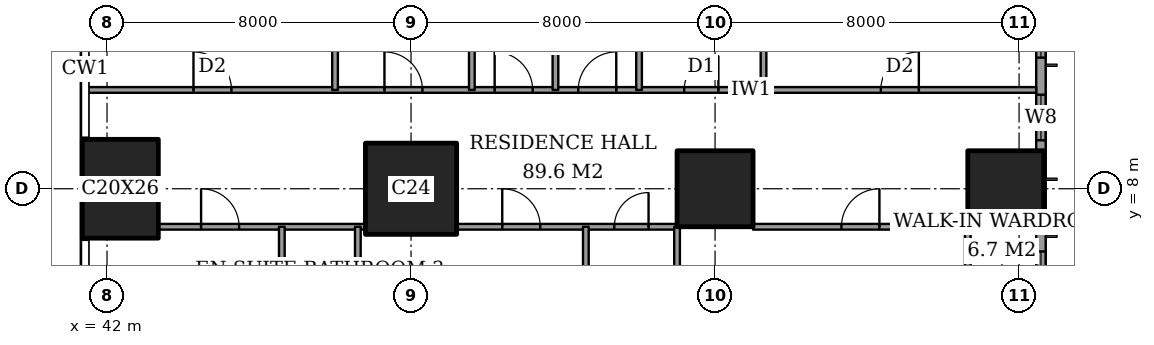
"""IFC4 building model, lengths in metres.
Left out: names, types, materials, properties, quantities, classifications, styles, units other than length and angle.
Written with IfcOpenShell. Run it as: python <this file> out.ifc"""

import sys

from ifc_helpers import new_model, si_unit, direction, frame, frame_2d, origin, origin_2d, place, context, subcontext, project, spatial, rectangle, extrude, element, fill, save


model = new_model("IFC4")
c1 = context("Model", 3, precision=1e-05, world=origin(), true_north=direction((0.0, 1.0)))
c2 = subcontext(c1, "Body", "Model", "MODEL_VIEW")
j1 = project(units=[si_unit("LENGTHUNIT", "METRE"), si_unit("PLANEANGLEUNIT", "RADIAN")], contexts=[c1])
p1 = place(None, origin())
s1 = spatial("IfcSite", under=j1, at=p1, CompositionType="ELEMENT")
p2 = place(p1, origin())
s2 = spatial("IfcBuilding", under=s1, at=p2, CompositionType="ELEMENT")
p3 = place(p2, frame((0.0, 0.0, 72.8)))
s3 = spatial("IfcBuildingStorey", under=s2, at=p3, CompositionType="ELEMENT", Elevation=72.8)
p4 = place(p3, frame((42.35, 8.0, 0.0), z_axis=(0.0, 0.0, 1.0), x_axis=(1.0, 0.0, 0.0)))
e1 = element("IfcColumn", 1, at=p4, inside=s3, PredefinedType="COLUMN", context=c2, shape_type="SweptSolid", body=[
    extrude(rectangle(XDim=2.0, YDim=2.6, at=origin_2d()), origin(), (0.0, 0.0, 1.0), 3.6),
])
p5 = place(p3, frame((50.0, 8.0, 0.0), z_axis=(0.0, 0.0, 1.0), x_axis=(1.0, 0.0, 0.0)))
e2 = element("IfcColumn", 2, at=p5, inside=s3, PredefinedType="COLUMN", context=c2, shape_type="SweptSolid", body=[
    extrude(rectangle(XDim=2.4, YDim=2.4, at=origin_2d()), origin(), (0.0, 0.0, 1.0), 3.6),
])
for number, where, z_axis, x_axis in (
    (3, (58.0, 8.0, 0.0), (0.0, 0.0, 1.0), (1.0, 0.0, 0.0)),
    (4, (65.65, 8.0, 0.0), (0.0, 0.0, 1.0), (1.0, 0.0, 0.0)),
):
    element("IfcColumn", number, at=place(p3, frame(where, z_axis=z_axis, x_axis=x_axis)), inside=s3, PredefinedType="COLUMN", context=c2, shape_type="SweptSolid", body=[
        extrude(rectangle(XDim=2.0, YDim=2.0, at=origin_2d()), origin(), (0.0, 0.0, 1.0), 3.6),
    ])
p6 = place(p3, frame((66.575, 3.175, 0.0), z_axis=(0.0, 0.0, 1.0), x_axis=(0.0, 1.0, 0.0)))
e5 = element("IfcWall", 5, at=p6, inside=s3, PredefinedType="SOLIDWALL", context=c2, shape_type="SweptSolid", body=[
    extrude(rectangle(XDim=41.65, YDim=0.25, at=frame_2d((20.825, 0.0))), origin(), (0.0, 0.0, 1.0), 3.6),
])
p7 = place(p6, frame((0.775, 0.0, 0.6)))
e6 = element("IfcOpeningElement", 6, at=p7, cuts=e5, PredefinedType="OPENING", context=c2, shape_type="SweptSolid", body=[
    extrude(rectangle(XDim=2.4, YDim=2.0, at=frame_2d((1.2, 1.0))), frame((0.0, 0.135, 0.0), z_axis=(0.0, -1.0, 0.0), x_axis=(1.0, 0.0, 0.0)), (0.0, 0.0, 1.0), 0.27),
])
p8 = place(p6, frame((6.1, 0.0, 0.6)))
e7 = element("IfcOpeningElement", 7, at=p8, cuts=e5, PredefinedType="OPENING", context=c2, shape_type="SweptSolid", body=[
    extrude(rectangle(XDim=1.2, YDim=2.0, at=frame_2d((0.6, 1.0))), frame((0.0, 0.135, 0.0), z_axis=(0.0, -1.0, 0.0), x_axis=(1.0, 0.0, 0.0)), (0.0, 0.0, 1.0), 0.27),
])
p9 = place(p6, frame((8.275, 0.0, 0.6)))
e8 = element("IfcOpeningElement", 8, at=p9, cuts=e5, PredefinedType="OPENING", context=c2, shape_type="SweptSolid", body=[
    extrude(rectangle(XDim=2.4, YDim=2.0, at=frame_2d((1.2, 1.0))), frame((0.0, 0.135, 0.0), z_axis=(0.0, -1.0, 0.0), x_axis=(1.0, 0.0, 0.0)), (0.0, 0.0, 1.0), 0.27),
])
p10 = place(p6, frame((15.775, 0.0, 0.6)))
e9 = element("IfcOpeningElement", 9, at=p10, cuts=e5, PredefinedType="OPENING", context=c2, shape_type="SweptSolid", body=[
    extrude(rectangle(XDim=2.4, YDim=2.0, at=frame_2d((1.2, 1.0))), frame((0.0, 0.135, 0.0), z_axis=(0.0, -1.0, 0.0), x_axis=(1.0, 0.0, 0.0)), (0.0, 0.0, 1.0), 0.27),
])
p11 = place(p6, frame((23.475, 0.0, 0.6)))
e10 = element("IfcOpeningElement", 10, at=p11, cuts=e5, PredefinedType="OPENING", context=c2, shape_type="SweptSolid", body=[
    extrude(rectangle(XDim=2.4, YDim=2.0, at=frame_2d((1.2, 1.0))), frame((0.0, 0.135, 0.0), z_axis=(0.0, -1.0, 0.0), x_axis=(1.0, 0.0, 0.0)), (0.0, 0.0, 1.0), 0.27),
])
p12 = place(p6, frame((30.975, 0.0, 0.6)))
e11 = element("IfcOpeningElement", 11, at=p12, cuts=e5, PredefinedType="OPENING", context=c2, shape_type="SweptSolid", body=[
    extrude(rectangle(XDim=2.4, YDim=2.0, at=frame_2d((1.2, 1.0))), frame((0.0, 0.135, 0.0), z_axis=(0.0, -1.0, 0.0), x_axis=(1.0, 0.0, 0.0)), (0.0, 0.0, 1.0), 0.27),
])
p13 = place(p6, frame((34.5, 0.0, 0.6)))
e12 = element("IfcOpeningElement", 12, at=p13, cuts=e5, PredefinedType="OPENING", context=c2, shape_type="SweptSolid", body=[
    extrude(rectangle(XDim=1.2, YDim=2.0, at=frame_2d((0.6, 1.0))), frame((0.0, 0.135, 0.0), z_axis=(0.0, -1.0, 0.0), x_axis=(1.0, 0.0, 0.0)), (0.0, 0.0, 1.0), 0.27),
])
p14 = place(p6, frame((38.475, 0.0, 0.6)))
e13 = element("IfcOpeningElement", 13, at=p14, cuts=e5, PredefinedType="OPENING", context=c2, shape_type="SweptSolid", body=[
    extrude(rectangle(XDim=2.4, YDim=2.0, at=frame_2d((1.2, 1.0))), frame((0.0, 0.135, 0.0), z_axis=(0.0, -1.0, 0.0), x_axis=(1.0, 0.0, 0.0)), (0.0, 0.0, 1.0), 0.27),
])
p15 = place(p3, frame((43.35, 7.0, 0.0), z_axis=(0.0, 0.0, 1.0), x_axis=(1.0, 0.0, 0.0)))
e14 = element("IfcWall", 14, at=p15, inside=s3, PredefinedType="PARTITIONING", context=c2, shape_type="SweptSolid", body=[
    extrude(rectangle(XDim=5.45, YDim=0.15, at=frame_2d((2.725, 0.0))), origin(), (0.0, 0.0, 1.0), 3.35),
])
p16 = place(p15, frame((1.125, 0.0, 0.0)))
e15 = element("IfcOpeningElement", 15, at=p16, cuts=e14, PredefinedType="OPENING", context=c2, shape_type="SweptSolid", body=[
    extrude(rectangle(XDim=1.0, YDim=2.1, at=frame_2d((0.5, 1.05))), frame((0.0, 0.085, 0.0), z_axis=(0.0, -1.0, 0.0), x_axis=(1.0, 0.0, 0.0)), (0.0, 0.0, 1.0), 0.17),
])
p17 = place(p3, frame((51.2, 7.0, 0.0), z_axis=(0.0, 0.0, 1.0), x_axis=(1.0, 0.0, 0.0)))
e16 = element("IfcWall", 16, at=p17, inside=s3, PredefinedType="PARTITIONING", context=c2, shape_type="SweptSolid", body=[
    extrude(rectangle(XDim=5.8, YDim=0.15, at=frame_2d((2.9, 0.0))), origin(), (0.0, 0.0, 1.0), 3.35),
])
p18 = place(p17, frame((4.15, 0.0, 0.0)))
e17 = element("IfcOpeningElement", 17, at=p18, cuts=e16, PredefinedType="OPENING", context=c2, shape_type="SweptSolid", body=[
    extrude(rectangle(XDim=0.9, YDim=2.1, at=frame_2d((0.45, 1.05))), frame((0.0, 0.085, 0.0), z_axis=(0.0, -1.0, 0.0), x_axis=(1.0, 0.0, 0.0)), (0.0, 0.0, 1.0), 0.17),
])
p19 = place(p17, frame((1.2, 0.0, 0.0)))
e18 = element("IfcOpeningElement", 18, at=p19, cuts=e16, PredefinedType="OPENING", context=c2, shape_type="SweptSolid", body=[
    extrude(rectangle(XDim=1.0, YDim=2.1, at=frame_2d((0.5, 1.05))), frame((0.0, 0.085, 0.0), z_axis=(0.0, -1.0, 0.0), x_axis=(1.0, 0.0, 0.0)), (0.0, 0.0, 1.0), 0.17),
])
p20 = place(p3, frame((59.0, 7.0, 0.0), z_axis=(0.0, 0.0, 1.0), x_axis=(1.0, 0.0, 0.0)))
e19 = element("IfcWall", 19, at=p20, inside=s3, PredefinedType="PARTITIONING", context=c2, shape_type="SweptSolid", body=[
    extrude(rectangle(XDim=5.65, YDim=0.15, at=frame_2d((2.825, 0.0))), origin(), (0.0, 0.0, 1.0), 3.35),
])
p21 = place(p20, frame((2.325, 0.0, 0.0)))
e20 = element("IfcOpeningElement", 20, at=p21, cuts=e19, PredefinedType="OPENING", context=c2, shape_type="SweptSolid", body=[
    extrude(rectangle(XDim=1.0, YDim=2.1, at=frame_2d((0.5, 1.05))), frame((0.0, 0.085, 0.0), z_axis=(0.0, -1.0, 0.0), x_axis=(1.0, 0.0, 0.0)), (0.0, 0.0, 1.0), 0.17),
])
p22 = place(p3, frame((41.439, 10.6, 0.0), z_axis=(0.0, 0.0, 1.0), x_axis=(1.0, 0.0, 0.0)))
e21 = element("IfcWall", 21, at=p22, inside=s3, PredefinedType="PARTITIONING", context=c2, shape_type="SweptSolid", body=[
    extrude(rectangle(XDim=25.011, YDim=0.15, at=frame_2d((12.505, 0.0))), origin(), (0.0, 0.0, 1.0), 3.35),
])
p23 = place(p22, frame((10.761, 0.0, 0.0)))
e22 = element("IfcOpeningElement", 22, at=p23, cuts=e21, PredefinedType="OPENING", context=c2, shape_type="SweptSolid", body=[
    extrude(rectangle(XDim=1.0, YDim=2.1, at=frame_2d((0.5, 1.05))), frame((0.0, 0.085, 0.0), z_axis=(0.0, -1.0, 0.0), x_axis=(1.0, 0.0, 0.0)), (0.0, 0.0, 1.0), 0.17),
])
p24 = place(p22, frame((20.924, 0.0, 0.0)))
e23 = element("IfcOpeningElement", 23, at=p24, cuts=e21, PredefinedType="OPENING", context=c2, shape_type="SweptSolid", body=[
    extrude(rectangle(XDim=1.0, YDim=2.1, at=frame_2d((0.5, 1.05))), frame((0.0, 0.085, 0.0), z_axis=(0.0, -1.0, 0.0), x_axis=(1.0, 0.0, 0.0)), (0.0, 0.0, 1.0), 0.17),
])
p25 = place(p22, frame((15.749, 0.0, 0.0)))
e24 = element("IfcOpeningElement", 24, at=p25, cuts=e21, PredefinedType="OPENING", context=c2, shape_type="SweptSolid", body=[
    extrude(rectangle(XDim=0.9, YDim=2.1, at=frame_2d((0.45, 1.05))), frame((0.0, 0.085, 0.0), z_axis=(0.0, -1.0, 0.0), x_axis=(1.0, 0.0, 0.0)), (0.0, 0.0, 1.0), 0.17),
])
p26 = place(p22, frame((12.961, 0.0, 0.0)))
e25 = element("IfcOpeningElement", 25, at=p26, cuts=e21, PredefinedType="OPENING", context=c2, shape_type="SweptSolid", body=[
    extrude(rectangle(XDim=1.0, YDim=2.1, at=frame_2d((0.5, 1.05))), frame((0.0, 0.085, 0.0), z_axis=(0.0, -1.0, 0.0), x_axis=(1.0, 0.0, 0.0)), (0.0, 0.0, 1.0), 0.17),
])
p27 = place(p22, frame((7.861, 0.0, 0.0)))
e26 = element("IfcOpeningElement", 26, at=p27, cuts=e21, PredefinedType="OPENING", context=c2, shape_type="SweptSolid", body=[
    extrude(rectangle(XDim=1.0, YDim=2.1, at=frame_2d((0.5, 1.05))), frame((0.0, 0.085, 0.0), z_axis=(0.0, -1.0, 0.0), x_axis=(1.0, 0.0, 0.0)), (0.0, 0.0, 1.0), 0.17),
])
p28 = place(p22, frame((2.836, 0.0, 0.0)))
e27 = element("IfcOpeningElement", 27, at=p28, cuts=e21, PredefinedType="OPENING", context=c2, shape_type="SweptSolid", body=[
    extrude(rectangle(XDim=1.0, YDim=2.1, at=frame_2d((0.5, 1.05))), frame((0.0, 0.085, 0.0), z_axis=(0.0, -1.0, 0.0), x_axis=(1.0, 0.0, 0.0)), (0.0, 0.0, 1.0), 0.17),
])
p29 = place(p3, frame((46.6, -0.45, 0.0), z_axis=(0.0, 0.0, 1.0), x_axis=(0.0, 1.0, 0.0)))
e28 = element("IfcWall", 28, at=p29, inside=s3, PredefinedType="PARTITIONING", context=c2, shape_type="SweptSolid", body=[
    extrude(rectangle(XDim=7.45, YDim=0.15, at=frame_2d((3.725, 0.0))), origin(), (0.0, 0.0, 1.0), 3.35),
])
p30 = place(p29, frame((3.275, 0.0, 0.0)))
e29 = element("IfcOpeningElement", 29, at=p30, cuts=e28, PredefinedType="OPENING", context=c2, shape_type="SweptSolid", body=[
    extrude(rectangle(XDim=0.9, YDim=2.1, at=frame_2d((0.45, 1.05))), frame((0.0, 0.085, 0.0), z_axis=(0.0, -1.0, 0.0), x_axis=(1.0, 0.0, 0.0)), (0.0, 0.0, 1.0), 0.17),
])
p31 = place(p3, frame((48.0, 10.6, 0.0), z_axis=(0.0, 0.0, 1.0), x_axis=(0.0, 1.0, 0.0)))
e30 = element("IfcWall", 30, at=p31, inside=s3, PredefinedType="PARTITIONING", context=c2, shape_type="SweptSolid", body=[
    extrude(rectangle(XDim=6.4, YDim=0.15, at=frame_2d((3.2, 0.0))), origin(), (0.0, 0.0, 1.0), 3.35),
])
p32 = place(p3, frame((48.6, -0.45, 0.0), z_axis=(0.0, 0.0, 1.0), x_axis=(0.0, 1.0, 0.0)))
e31 = element("IfcWall", 31, at=p32, inside=s3, PredefinedType="PARTITIONING", context=c2, shape_type="SweptSolid", body=[
    extrude(rectangle(XDim=7.45, YDim=0.15, at=frame_2d((3.725, 0.0))), origin(), (0.0, 0.0, 1.0), 3.35),
])
for number, where, z_axis, x_axis in (
    (32, (51.6, 10.6, 0.0), (0.0, 0.0, 1.0), (0.0, 1.0, 0.0)),
    (33, (53.8, 10.6, 0.0), (0.0, 0.0, 1.0), (0.0, 1.0, 0.0)),
):
    element("IfcWall", number, at=place(p3, frame(where, z_axis=z_axis, x_axis=x_axis)), inside=s3, PredefinedType="PARTITIONING", context=c2, shape_type="SweptSolid", body=[
        extrude(rectangle(XDim=6.4, YDim=0.15, at=frame_2d((3.2, 0.0))), origin(), (0.0, 0.0, 1.0), 3.35),
    ])
p33 = place(p3, frame((54.6, -0.45, 0.0), z_axis=(0.0, 0.0, 1.0), x_axis=(0.0, 1.0, 0.0)))
e34 = element("IfcWall", 34, at=p33, inside=s3, PredefinedType="PARTITIONING", context=c2, shape_type="SweptSolid", body=[
    extrude(rectangle(XDim=7.45, YDim=0.15, at=frame_2d((3.725, 0.0))), origin(), (0.0, 0.0, 1.0), 3.35),
])
p34 = place(p3, frame((56.0, 10.6, 0.0), z_axis=(0.0, 0.0, 1.0), x_axis=(0.0, 1.0, 0.0)))
e35 = element("IfcWall", 35, at=p34, inside=s3, PredefinedType="PARTITIONING", context=c2, shape_type="SweptSolid", body=[
    extrude(rectangle(XDim=11.0, YDim=0.15, at=frame_2d((5.5, 0.0))), origin(), (0.0, 0.0, 1.0), 3.35),
])
p35 = place(p34, frame((8.2, 0.0, 0.0)))
e36 = element("IfcOpeningElement", 36, at=p35, cuts=e35, PredefinedType="OPENING", context=c2, shape_type="SweptSolid", body=[
    extrude(rectangle(XDim=1.0, YDim=2.1, at=frame_2d((0.5, 1.05))), frame((0.0, 0.085, 0.0), z_axis=(0.0, -1.0, 0.0), x_axis=(1.0, 0.0, 0.0)), (0.0, 0.0, 1.0), 0.17),
])
p36 = place(p3, frame((57.0, 1.35, 0.0), z_axis=(0.0, 0.0, 1.0), x_axis=(0.0, 1.0, 0.0)))
e37 = element("IfcWall", 37, at=p36, inside=s3, PredefinedType="PARTITIONING", context=c2, shape_type="SweptSolid", body=[
    extrude(rectangle(XDim=5.65, YDim=0.15, at=frame_2d((2.825, 0.0))), origin(), (0.0, 0.0, 1.0), 3.35),
])
p37 = place(p3, frame((59.275, 10.6, 0.0), z_axis=(0.0, 0.0, 1.0), x_axis=(0.0, 1.0, 0.0)))
e38 = element("IfcWall", 38, at=p37, inside=s3, PredefinedType="PARTITIONING", context=c2, shape_type="SweptSolid", body=[
    extrude(rectangle(XDim=4.2, YDim=0.15, at=frame_2d((2.1, 0.0))), origin(), (0.0, 0.0, 1.0), 3.35),
])
p38 = place(p3, frame((64.65, 3.3, 0.0), z_axis=(0.0, 0.0, 1.0), x_axis=(0.0, 1.0, 0.0)))
e39 = element("IfcWall", 39, at=p38, inside=s3, PredefinedType="PARTITIONING", context=c2, shape_type="SweptSolid", body=[
    extrude(rectangle(XDim=3.7, YDim=0.15, at=frame_2d((1.85, 0.0))), origin(), (0.0, 0.0, 1.0), 3.35),
])
p39 = place(p38, frame((1.4, 0.0, 0.0)))
e40 = element("IfcOpeningElement", 40, at=p39, cuts=e39, PredefinedType="OPENING", context=c2, shape_type="SweptSolid", body=[
    extrude(rectangle(XDim=0.9, YDim=2.1, at=frame_2d((0.45, 1.05))), frame((0.0, 0.085, 0.0), z_axis=(0.0, -1.0, 0.0), x_axis=(1.0, 0.0, 0.0)), (0.0, 0.0, 1.0), 0.17),
])
p40 = place(p7, origin())
e41 = element("IfcWindow", 41, at=p40, inside=s3, PartitioningType="SINGLE_PANEL", PredefinedType="WINDOW", context=c2, shape_type="SweptSolid", body=[
    extrude(rectangle(XDim=2.4, YDim=2.0, at=frame_2d((1.2, 1.0))), frame((0.0, 0.03, 0.0), z_axis=(0.0, -1.0, 0.0), x_axis=(1.0, 0.0, 0.0)), (0.0, 0.0, 1.0), 0.06),
])
fill(e6, e41)
p41 = place(p8, origin())
e42 = element("IfcWindow", 42, at=p41, inside=s3, PartitioningType="SINGLE_PANEL", PredefinedType="WINDOW", context=c2, shape_type="SweptSolid", body=[
    extrude(rectangle(XDim=1.2, YDim=2.0, at=frame_2d((0.6, 1.0))), frame((0.0, 0.03, 0.0), z_axis=(0.0, -1.0, 0.0), x_axis=(1.0, 0.0, 0.0)), (0.0, 0.0, 1.0), 0.06),
])
fill(e7, e42)
p42 = place(p9, origin())
e43 = element("IfcWindow", 43, at=p42, inside=s3, PartitioningType="SINGLE_PANEL", PredefinedType="WINDOW", context=c2, shape_type="SweptSolid", body=[
    extrude(rectangle(XDim=2.4, YDim=2.0, at=frame_2d((1.2, 1.0))), frame((0.0, 0.03, 0.0), z_axis=(0.0, -1.0, 0.0), x_axis=(1.0, 0.0, 0.0)), (0.0, 0.0, 1.0), 0.06),
])
fill(e8, e43)
p43 = place(p21, origin())
e44 = element("IfcDoor", 44, at=p43, inside=s3, OperationType="SINGLE_SWING_LEFT", PredefinedType="DOOR", context=c2, shape_type="SweptSolid", body=[
    extrude(rectangle(XDim=1.0, YDim=2.1, at=frame_2d((0.5, 1.05))), frame((0.0, 0.025, 0.0), z_axis=(0.0, -1.0, 0.0), x_axis=(1.0, 0.0, 0.0)), (0.0, 0.0, 1.0), 0.05),
])
fill(e20, e44)
p44 = place(p18, origin())
e45 = element("IfcDoor", 45, at=p44, inside=s3, OperationType="SINGLE_SWING_LEFT", PredefinedType="DOOR", context=c2, shape_type="SweptSolid", body=[
    extrude(rectangle(XDim=0.9, YDim=2.1, at=frame_2d((0.45, 1.05))), frame((0.0, 0.025, 0.0), z_axis=(0.0, -1.0, 0.0), x_axis=(1.0, 0.0, 0.0)), (0.0, 0.0, 1.0), 0.05),
])
fill(e17, e45)
p45 = place(p19, origin())
e46 = element("IfcDoor", 46, at=p45, inside=s3, OperationType="SINGLE_SWING_RIGHT", PredefinedType="DOOR", context=c2, shape_type="SweptSolid", body=[
    extrude(rectangle(XDim=1.0, YDim=2.1, at=frame_2d((0.5, 1.05))), frame((0.0, 0.025, 0.0), z_axis=(0.0, -1.0, 0.0), x_axis=(1.0, 0.0, 0.0)), (0.0, 0.0, 1.0), 0.05),
])
fill(e18, e46)
p46 = place(p16, origin())
e47 = element("IfcDoor", 47, at=p46, inside=s3, OperationType="SINGLE_SWING_RIGHT", PredefinedType="DOOR", context=c2, shape_type="SweptSolid", body=[
    extrude(rectangle(XDim=1.0, YDim=2.1, at=frame_2d((0.5, 1.05))), frame((0.0, 0.025, 0.0), z_axis=(0.0, -1.0, 0.0), x_axis=(1.0, 0.0, 0.0)), (0.0, 0.0, 1.0), 0.05),
])
fill(e15, e47)
p47 = place(p23, origin())
e48 = element("IfcDoor", 48, at=p47, inside=s3, OperationType="SINGLE_SWING_RIGHT", PredefinedType="DOOR", context=c2, shape_type="SweptSolid", body=[
    extrude(rectangle(XDim=1.0, YDim=2.1, at=frame_2d((0.5, 1.05))), frame((0.0, 0.025, 0.0), z_axis=(0.0, -1.0, 0.0), x_axis=(1.0, 0.0, 0.0)), (0.0, 0.0, 1.0), 0.05),
])
fill(e22, e48)
p48 = place(p24, origin())
e49 = element("IfcDoor", 49, at=p48, inside=s3, OperationType="SINGLE_SWING_LEFT", PredefinedType="DOOR", context=c2, shape_type="SweptSolid", body=[
    extrude(rectangle(XDim=1.0, YDim=2.1, at=frame_2d((0.5, 1.05))), frame((0.0, 0.025, 0.0), z_axis=(0.0, -1.0, 0.0), x_axis=(1.0, 0.0, 0.0)), (0.0, 0.0, 1.0), 0.05),
])
fill(e23, e49)
p49 = place(p25, origin())
e50 = element("IfcDoor", 50, at=p49, inside=s3, OperationType="SINGLE_SWING_LEFT", PredefinedType="DOOR", context=c2, shape_type="SweptSolid", body=[
    extrude(rectangle(XDim=0.9, YDim=2.1, at=frame_2d((0.45, 1.05))), frame((0.0, 0.025, 0.0), z_axis=(0.0, -1.0, 0.0), x_axis=(1.0, 0.0, 0.0)), (0.0, 0.0, 1.0), 0.05),
])
fill(e24, e50)
p50 = place(p26, origin())
e51 = element("IfcDoor", 51, at=p50, inside=s3, OperationType="SINGLE_SWING_LEFT", PredefinedType="DOOR", context=c2, shape_type="SweptSolid", body=[
    extrude(rectangle(XDim=1.0, YDim=2.1, at=frame_2d((0.5, 1.05))), frame((0.0, 0.025, 0.0), z_axis=(0.0, -1.0, 0.0), x_axis=(1.0, 0.0, 0.0)), (0.0, 0.0, 1.0), 0.05),
])
fill(e25, e51)
p51 = place(p27, origin())
e52 = element("IfcDoor", 52, at=p51, inside=s3, OperationType="SINGLE_SWING_RIGHT", PredefinedType="DOOR", context=c2, shape_type="SweptSolid", body=[
    extrude(rectangle(XDim=1.0, YDim=2.1, at=frame_2d((0.5, 1.05))), frame((0.0, 0.025, 0.0), z_axis=(0.0, -1.0, 0.0), x_axis=(1.0, 0.0, 0.0)), (0.0, 0.0, 1.0), 0.05),
])
fill(e26, e52)
p52 = place(p28, origin())
e53 = element("IfcDoor", 53, at=p52, inside=s3, OperationType="SINGLE_SWING_RIGHT", PredefinedType="DOOR", context=c2, shape_type="SweptSolid", body=[
    extrude(rectangle(XDim=1.0, YDim=2.1, at=frame_2d((0.5, 1.05))), frame((0.0, 0.025, 0.0), z_axis=(0.0, -1.0, 0.0), x_axis=(1.0, 0.0, 0.0)), (0.0, 0.0, 1.0), 0.05),
])
fill(e27, e53)
save(model, sys.argv[1])
